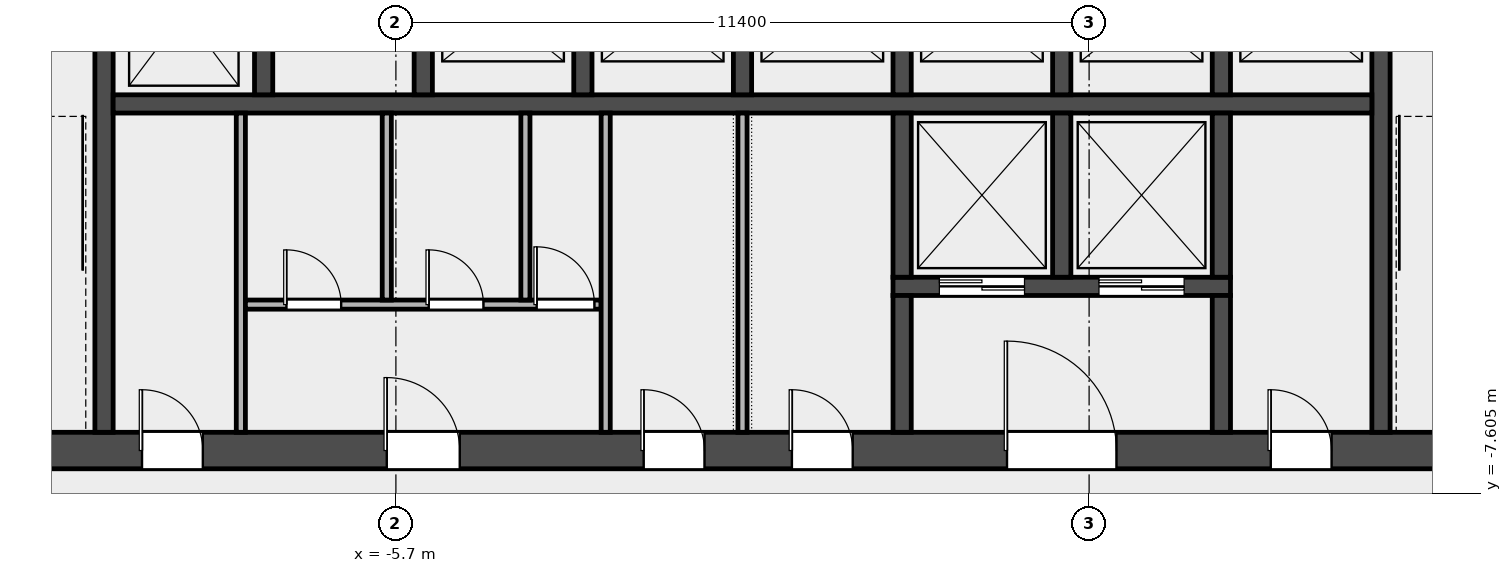
"""IFC4 building model, lengths in metres.
Left out: names, types, materials, properties, quantities, classifications, styles, units other than length and angle.
Written with IfcOpenShell. Run it as: python <this file> out.ifc"""

import sys

from ifc_helpers import new_model, si_unit, direction, frame, frame_2d, origin, place, context, subcontext, project, spatial, rectangle, extrude, element, fill, save


model = new_model("IFC4")
c1 = context("Model", 3, precision=1e-05, world=origin(), true_north=direction((0.0, 1.0)))
c2 = subcontext(c1, "Body", "Model", "MODEL_VIEW")
j1 = project(units=[si_unit("LENGTHUNIT", "METRE"), si_unit("PLANEANGLEUNIT", "RADIAN")], contexts=[c1])
p1 = place(None, origin())
s1 = spatial("IfcSite", under=j1, at=p1, CompositionType="ELEMENT")
p2 = place(p1, origin())
s2 = spatial("IfcBuilding", under=s1, at=p2, CompositionType="ELEMENT")
p3 = place(p2, frame((0.0, 0.0, 88.6)))
s3 = spatial("IfcBuildingStorey", under=s2, at=p3, CompositionType="ELEMENT", Elevation=88.6)
p4 = place(p3, frame((-14.4, -6.9, 0.0), z_axis=(0.0, 0.0, 1.0), x_axis=(1.0, 0.0, 0.0)))
e1 = element("IfcWall", 1, at=p4, inside=s3, PredefinedType="SHEAR", context=c2, shape_type="SweptSolid", body=[
    extrude(rectangle(XDim=28.8, YDim=0.6, at=frame_2d((14.4, 0.0))), origin(), (0.0, 0.0, 1.0), 5.7),
])
p5 = place(p4, frame((4.525, 0.0, 0.0)))
e2 = element("IfcOpeningElement", 2, at=p5, cuts=e1, PredefinedType="OPENING", context=c2, shape_type="SweptSolid", body=[
    extrude(rectangle(XDim=1.0, YDim=2.1, at=frame_2d((0.5, 1.05))), frame((0.0, 0.312, 0.0), z_axis=(0.0, -1.0, 0.0), x_axis=(1.0, 0.0, 0.0)), (0.0, 0.0, 1.0), 0.624),
])
p6 = place(p4, frame((8.55, 0.0, 0.0)))
e3 = element("IfcOpeningElement", 3, at=p6, cuts=e1, PredefinedType="OPENING", context=c2, shape_type="SweptSolid", body=[
    extrude(rectangle(XDim=1.2, YDim=2.1, at=frame_2d((0.6, 1.05))), frame((0.0, 0.312, 0.0), z_axis=(0.0, -1.0, 0.0), x_axis=(1.0, 0.0, 0.0)), (0.0, 0.0, 1.0), 0.624),
])
p7 = place(p4, frame((12.775, 0.0, 0.0)))
e4 = element("IfcOpeningElement", 4, at=p7, cuts=e1, PredefinedType="OPENING", context=c2, shape_type="SweptSolid", body=[
    extrude(rectangle(XDim=1.0, YDim=2.1, at=frame_2d((0.5, 1.05))), frame((0.0, 0.312, 0.0), z_axis=(0.0, -1.0, 0.0), x_axis=(1.0, 0.0, 0.0)), (0.0, 0.0, 1.0), 0.624),
])
p8 = place(p4, frame((15.212, 0.0, 0.0)))
e5 = element("IfcOpeningElement", 5, at=p8, cuts=e1, PredefinedType="OPENING", context=c2, shape_type="SweptSolid", body=[
    extrude(rectangle(XDim=1.0, YDim=2.1, at=frame_2d((0.5, 1.05))), frame((0.0, 0.312, 0.0), z_axis=(0.0, -1.0, 0.0), x_axis=(1.0, 0.0, 0.0)), (0.0, 0.0, 1.0), 0.624),
])
p9 = place(p4, frame((18.75, 0.0, 0.0)))
e6 = element("IfcOpeningElement", 6, at=p9, cuts=e1, PredefinedType="OPENING", context=c2, shape_type="SweptSolid", body=[
    extrude(rectangle(XDim=1.8, YDim=2.1, at=frame_2d((0.9, 1.05))), frame((0.0, 0.312, 0.0), z_axis=(0.0, -1.0, 0.0), x_axis=(1.0, 0.0, 0.0)), (0.0, 0.0, 1.0), 0.624),
])
p10 = place(p4, frame((23.087, 0.0, 0.0)))
e7 = element("IfcOpeningElement", 7, at=p10, cuts=e1, PredefinedType="OPENING", context=c2, shape_type="SweptSolid", body=[
    extrude(rectangle(XDim=1.0, YDim=2.1, at=frame_2d((0.5, 1.05))), frame((0.0, 0.312, 0.0), z_axis=(0.0, -1.0, 0.0), x_axis=(1.0, 0.0, 0.0)), (0.0, 0.0, 1.0), 0.624),
])
for number, where, z_axis, x_axis in (
    (8, (-10.5, -6.6, 0.0), (0.0, 0.0, 1.0), (0.0, 1.0, 0.0)),
    (9, (10.5, -6.6, 0.0), (0.0, 0.0, 1.0), (0.0, 1.0, 0.0)),
):
    element("IfcWall", number, at=place(p3, frame(where, z_axis=z_axis, x_axis=x_axis)), inside=s3, PredefinedType="SHEAR", context=c2, shape_type="SweptSolid", body=[
        extrude(rectangle(XDim=8.55, YDim=0.3, at=frame_2d((4.275, 0.0))), origin(), (0.0, 0.0, 1.0), 5.7),
    ])
p11 = place(p3, frame((-10.35, -1.2, 0.0), z_axis=(0.0, 0.0, 1.0), x_axis=(1.0, 0.0, 0.0)))
e10 = element("IfcWall", 10, at=p11, inside=s3, PredefinedType="SOLIDWALL", context=c2, shape_type="SweptSolid", body=[
    extrude(rectangle(XDim=20.7, YDim=0.3, at=frame_2d((10.35, 0.0))), origin(), (0.0, 0.0, 1.0), 5.7),
])
for number, where, z_axis, x_axis in (
    (11, (-7.875, -1.05, 0.0), (0.0, 0.0, 1.0), (0.0, 1.0, 0.0)),
    (12, (-5.25, -1.05, 0.0), (0.0, 0.0, 1.0), (0.0, 1.0, 0.0)),
    (13, (-2.625, -1.05, 0.0), (0.0, 0.0, 1.0), (0.0, 1.0, 0.0)),
    (14, (0.0, -1.05, 0.0), (0.0, 0.0, 1.0), (0.0, 1.0, 0.0)),
    (15, (2.625, -1.05, 0.0), (0.0, 0.0, 1.0), (0.0, 1.0, 0.0)),
    (16, (5.25, -1.05, 0.0), (0.0, 0.0, 1.0), (0.0, 1.0, 0.0)),
    (17, (7.875, -1.05, 0.0), (0.0, 0.0, 1.0), (0.0, 1.0, 0.0)),
):
    element("IfcWall", number, at=place(p3, frame(where, z_axis=z_axis, x_axis=x_axis)), inside=s3, PredefinedType="SOLIDWALL", context=c2, shape_type="SweptSolid", body=[
        extrude(rectangle(XDim=2.7, YDim=0.3, at=frame_2d((1.35, 0.0))), origin(), (0.0, 0.0, 1.0), 5.7),
    ])
p12 = place(p3, frame((2.475, -4.2, 0.0), z_axis=(0.0, 0.0, 1.0), x_axis=(1.0, 0.0, 0.0)))
e18 = element("IfcWall", 18, at=p12, inside=s3, PredefinedType="SOLIDWALL", context=c2, shape_type="SweptSolid", body=[
    extrude(rectangle(XDim=5.55, YDim=0.3, at=frame_2d((2.775, 0.0))), origin(), (0.0, 0.0, 1.0), 5.7),
])
p13 = place(p12, frame((0.762, 0.0, 0.0)))
e19 = element("IfcOpeningElement", 19, at=p13, cuts=e18, PredefinedType="OPENING", context=c2, shape_type="SweptSolid", body=[
    extrude(rectangle(XDim=1.4, YDim=2.1, at=frame_2d((0.7, 1.05))), frame((0.0, 0.162, 0.0), z_axis=(0.0, -1.0, 0.0), x_axis=(1.0, 0.0, 0.0)), (0.0, 0.0, 1.0), 0.324),
])
p14 = place(p12, frame((3.387, 0.0, 0.0)))
e20 = element("IfcOpeningElement", 20, at=p14, cuts=e18, PredefinedType="OPENING", context=c2, shape_type="SweptSolid", body=[
    extrude(rectangle(XDim=1.4, YDim=2.1, at=frame_2d((0.7, 1.05))), frame((0.0, 0.162, 0.0), z_axis=(0.0, -1.0, 0.0), x_axis=(1.0, 0.0, 0.0)), (0.0, 0.0, 1.0), 0.324),
])
p15 = place(p3, frame((2.625, -4.05, 0.0), z_axis=(0.0, 0.0, 1.0), x_axis=(0.0, 1.0, 0.0)))
e21 = element("IfcWall", 21, at=p15, inside=s3, PredefinedType="SOLIDWALL", context=c2, shape_type="SweptSolid", body=[
    extrude(rectangle(XDim=2.7, YDim=0.3, at=frame_2d((1.35, 0.0))), origin(), (0.0, 0.0, 1.0), 5.7),
])
p16 = place(p3, frame((2.625, -6.6, 0.0), z_axis=(0.0, 0.0, 1.0), x_axis=(0.0, 1.0, 0.0)))
e22 = element("IfcWall", 22, at=p16, inside=s3, PredefinedType="SOLIDWALL", context=c2, shape_type="SweptSolid", body=[
    extrude(rectangle(XDim=2.25, YDim=0.3, at=frame_2d((1.125, 0.0))), origin(), (0.0, 0.0, 1.0), 5.7),
])
for number, where, z_axis, x_axis in (
    (23, (5.25, -4.05, 0.0), (0.0, 0.0, 1.0), (0.0, 1.0, 0.0)),
    (24, (7.875, -4.05, 0.0), (0.0, 0.0, 1.0), (0.0, 1.0, 0.0)),
):
    element("IfcWall", number, at=place(p3, frame(where, z_axis=z_axis, x_axis=x_axis)), inside=s3, PredefinedType="SOLIDWALL", context=c2, shape_type="SweptSolid", body=[
        extrude(rectangle(XDim=2.7, YDim=0.3, at=frame_2d((1.35, 0.0))), origin(), (0.0, 0.0, 1.0), 5.7),
    ])
p17 = place(p3, frame((7.875, -6.6, 0.0), z_axis=(0.0, 0.0, 1.0), x_axis=(0.0, 1.0, 0.0)))
e25 = element("IfcWall", 25, at=p17, inside=s3, PredefinedType="SOLIDWALL", context=c2, shape_type="SweptSolid", body=[
    extrude(rectangle(XDim=2.25, YDim=0.3, at=frame_2d((1.125, 0.0))), origin(), (0.0, 0.0, 1.0), 5.7),
])
p18 = place(p3, frame((-8.25, -6.6, 0.0), z_axis=(0.0, 0.0, 1.0), x_axis=(0.0, 1.0, 0.0)))
e26 = element("IfcWall", 26, at=p18, inside=s3, PredefinedType="PARTITIONING", context=c2, shape_type="SweptSolid", body=[
    extrude(rectangle(XDim=5.25, YDim=0.15, at=frame_2d((2.625, 0.0))), origin(), (0.0, 0.0, 1.0), 5.7),
])
p19 = place(p3, frame((-8.175, -4.5, 0.0), z_axis=(0.0, 0.0, 1.0), x_axis=(1.0, 0.0, 0.0)))
e27 = element("IfcWall", 27, at=p19, inside=s3, PredefinedType="PARTITIONING", context=c2, shape_type="SweptSolid", body=[
    extrude(rectangle(XDim=5.85, YDim=0.15, at=frame_2d((2.925, 0.0))), origin(), (0.0, 0.0, 1.0), 5.7),
])
p20 = place(p19, frame((0.675, 0.0, 0.0)))
e28 = element("IfcOpeningElement", 28, at=p20, cuts=e27, PredefinedType="OPENING", context=c2, shape_type="SweptSolid", body=[
    extrude(rectangle(XDim=0.9, YDim=2.1, at=frame_2d((0.45, 1.05))), frame((0.0, 0.087, 0.0), z_axis=(0.0, -1.0, 0.0), x_axis=(1.0, 0.0, 0.0)), (0.0, 0.0, 1.0), 0.174),
])
p21 = place(p19, frame((3.015, 0.0, 0.0)))
e29 = element("IfcOpeningElement", 29, at=p21, cuts=e27, PredefinedType="OPENING", context=c2, shape_type="SweptSolid", body=[
    extrude(rectangle(XDim=0.9, YDim=2.1, at=frame_2d((0.45, 1.05))), frame((0.0, 0.087, 0.0), z_axis=(0.0, -1.0, 0.0), x_axis=(1.0, 0.0, 0.0)), (0.0, 0.0, 1.0), 0.174),
])
p22 = place(p19, frame((4.79, 0.0, 0.0)))
e30 = element("IfcOpeningElement", 30, at=p22, cuts=e27, PredefinedType="OPENING", context=c2, shape_type="SweptSolid", body=[
    extrude(rectangle(XDim=0.95, YDim=2.1, at=frame_2d((0.475, 1.05))), frame((0.0, 0.087, 0.0), z_axis=(0.0, -1.0, 0.0), x_axis=(1.0, 0.0, 0.0)), (0.0, 0.0, 1.0), 0.174),
])
for number, where, z_axis, x_axis in (
    (31, (-5.85, -4.425, 0.0), (0.0, 0.0, 1.0), (0.0, 1.0, 0.0)),
    (32, (-3.57, -4.425, 0.0), (0.0, 0.0, 1.0), (0.0, 1.0, 0.0)),
):
    element("IfcWall", number, at=place(p3, frame(where, z_axis=z_axis, x_axis=x_axis)), inside=s3, PredefinedType="PARTITIONING", context=c2, shape_type="SweptSolid", body=[
        extrude(rectangle(XDim=3.075, YDim=0.15, at=frame_2d((1.538, 0.0))), origin(), (0.0, 0.0, 1.0), 5.7),
    ])
for number, where, z_axis, x_axis in (
    (33, (-2.25, -6.6, 0.0), (0.0, 0.0, 1.0), (0.0, 1.0, 0.0)),
    (34, (0.0, -6.6, 0.0), (0.0, 0.0, 1.0), (0.0, 1.0, 0.0)),
):
    element("IfcWall", number, at=place(p3, frame(where, z_axis=z_axis, x_axis=x_axis)), inside=s3, PredefinedType="PARTITIONING", context=c2, shape_type="SweptSolid", body=[
        extrude(rectangle(XDim=5.25, YDim=0.15, at=frame_2d((2.625, 0.0))), origin(), (0.0, 0.0, 1.0), 5.7),
    ])
p23 = place(p13, origin())
e35 = element("IfcDoor", 35, at=p23, inside=s3, OperationType="DOUBLE_DOOR_SLIDING", PredefinedType="DOOR", context=c2, shape_type="SweptSolid", body=[
    extrude(rectangle(XDim=1.4, YDim=2.1, at=frame_2d((0.7, 1.05))), frame((0.0, 0.025, 0.0), z_axis=(0.0, -1.0, 0.0), x_axis=(1.0, 0.0, 0.0)), (0.0, 0.0, 1.0), 0.05),
])
fill(e19, e35)
p24 = place(p14, origin())
e36 = element("IfcDoor", 36, at=p24, inside=s3, OperationType="DOUBLE_DOOR_SLIDING", PredefinedType="DOOR", context=c2, shape_type="SweptSolid", body=[
    extrude(rectangle(XDim=1.4, YDim=2.1, at=frame_2d((0.7, 1.05))), frame((0.0, 0.025, 0.0), z_axis=(0.0, -1.0, 0.0), x_axis=(1.0, 0.0, 0.0)), (0.0, 0.0, 1.0), 0.05),
])
fill(e20, e36)
p25 = place(p5, origin())
e37 = element("IfcDoor", 37, at=p25, inside=s3, OperationType="SINGLE_SWING_LEFT", PredefinedType="DOOR", context=c2, shape_type="SweptSolid", body=[
    extrude(rectangle(XDim=1.0, YDim=2.1, at=frame_2d((0.5, 1.05))), frame((0.0, 0.025, 0.0), z_axis=(0.0, -1.0, 0.0), x_axis=(1.0, 0.0, 0.0)), (0.0, 0.0, 1.0), 0.05),
])
fill(e2, e37)
p26 = place(p6, origin())
e38 = element("IfcDoor", 38, at=p26, inside=s3, OperationType="SINGLE_SWING_LEFT", PredefinedType="DOOR", context=c2, shape_type="SweptSolid", body=[
    extrude(rectangle(XDim=1.2, YDim=2.1, at=frame_2d((0.6, 1.05))), frame((0.0, 0.025, 0.0), z_axis=(0.0, -1.0, 0.0), x_axis=(1.0, 0.0, 0.0)), (0.0, 0.0, 1.0), 0.05),
])
fill(e3, e38)
p27 = place(p20, origin())
e39 = element("IfcDoor", 39, at=p27, inside=s3, OperationType="SINGLE_SWING_LEFT", PredefinedType="DOOR", context=c2, shape_type="SweptSolid", body=[
    extrude(rectangle(XDim=0.9, YDim=2.1, at=frame_2d((0.45, 1.05))), frame((0.0, 0.025, 0.0), z_axis=(0.0, -1.0, 0.0), x_axis=(1.0, 0.0, 0.0)), (0.0, 0.0, 1.0), 0.05),
])
fill(e28, e39)
p28 = place(p21, origin())
e40 = element("IfcDoor", 40, at=p28, inside=s3, OperationType="SINGLE_SWING_LEFT", PredefinedType="DOOR", context=c2, shape_type="SweptSolid", body=[
    extrude(rectangle(XDim=0.9, YDim=2.1, at=frame_2d((0.45, 1.05))), frame((0.0, 0.025, 0.0), z_axis=(0.0, -1.0, 0.0), x_axis=(1.0, 0.0, 0.0)), (0.0, 0.0, 1.0), 0.05),
])
fill(e29, e40)
p29 = place(p22, origin())
e41 = element("IfcDoor", 41, at=p29, inside=s3, OperationType="SINGLE_SWING_LEFT", PredefinedType="DOOR", context=c2, shape_type="SweptSolid", body=[
    extrude(rectangle(XDim=0.95, YDim=2.1, at=frame_2d((0.475, 1.05))), frame((0.0, 0.025, 0.0), z_axis=(0.0, -1.0, 0.0), x_axis=(1.0, 0.0, 0.0)), (0.0, 0.0, 1.0), 0.05),
])
fill(e30, e41)
p30 = place(p7, origin())
e42 = element("IfcDoor", 42, at=p30, inside=s3, OperationType="SINGLE_SWING_LEFT", PredefinedType="DOOR", context=c2, shape_type="SweptSolid", body=[
    extrude(rectangle(XDim=1.0, YDim=2.1, at=frame_2d((0.5, 1.05))), frame((0.0, 0.025, 0.0), z_axis=(0.0, -1.0, 0.0), x_axis=(1.0, 0.0, 0.0)), (0.0, 0.0, 1.0), 0.05),
])
fill(e4, e42)
p31 = place(p8, origin())
e43 = element("IfcDoor", 43, at=p31, inside=s3, OperationType="SINGLE_SWING_LEFT", PredefinedType="DOOR", context=c2, shape_type="SweptSolid", body=[
    extrude(rectangle(XDim=1.0, YDim=2.1, at=frame_2d((0.5, 1.05))), frame((0.0, 0.025, 0.0), z_axis=(0.0, -1.0, 0.0), x_axis=(1.0, 0.0, 0.0)), (0.0, 0.0, 1.0), 0.05),
])
fill(e5, e43)
p32 = place(p9, origin())
e44 = element("IfcDoor", 44, at=p32, inside=s3, OperationType="DOUBLE_DOOR_SINGLE_SWING", PredefinedType="DOOR", context=c2, shape_type="SweptSolid", body=[
    extrude(rectangle(XDim=1.8, YDim=2.1, at=frame_2d((0.9, 1.05))), frame((0.0, 0.025, 0.0), z_axis=(0.0, -1.0, 0.0), x_axis=(1.0, 0.0, 0.0)), (0.0, 0.0, 1.0), 0.05),
])
fill(e6, e44)
p33 = place(p10, origin())
e45 = element("IfcDoor", 45, at=p33, inside=s3, OperationType="SINGLE_SWING_LEFT", PredefinedType="DOOR", context=c2, shape_type="SweptSolid", body=[
    extrude(rectangle(XDim=1.0, YDim=2.1, at=frame_2d((0.5, 1.05))), frame((0.0, 0.025, 0.0), z_axis=(0.0, -1.0, 0.0), x_axis=(1.0, 0.0, 0.0)), (0.0, 0.0, 1.0), 0.05),
])
fill(e7, e45)
save(model, sys.argv[1])
